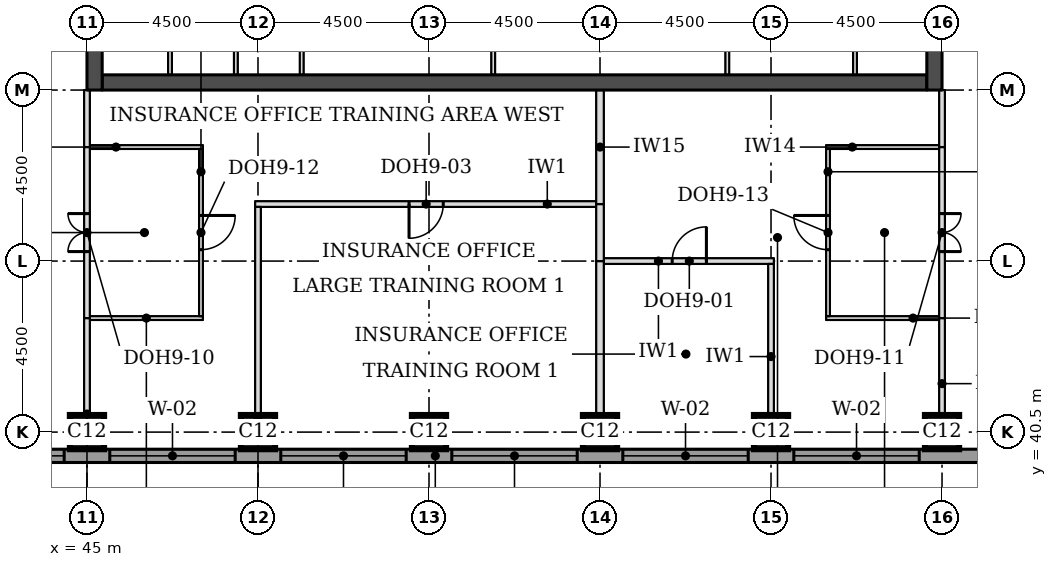
"""IFC4 building model, lengths in metres.
Left out: names, types, materials, properties, quantities, classifications, styles, units other than length and angle.
Written with IfcOpenShell. Run it as: python <this file> out.ifc"""

import sys

from ifc_helpers import new_model, si_unit, direction, frame, frame_2d, origin, origin_2d, place, context, subcontext, project, spatial, rectangle, extrude, element, fill, save


model = new_model("IFC4")
c1 = context("Model", 3, precision=1e-05, world=origin(), true_north=direction((0.0, 1.0)))
c2 = subcontext(c1, "Body", "Model", "MODEL_VIEW")
j1 = project(units=[si_unit("LENGTHUNIT", "METRE"), si_unit("PLANEANGLEUNIT", "RADIAN")], contexts=[c1])
p1 = place(None, origin())
s1 = spatial("IfcSite", under=j1, at=p1, CompositionType="ELEMENT")
p2 = place(p1, origin())
s2 = spatial("IfcBuilding", under=s1, at=p2, CompositionType="ELEMENT")
p3 = place(p2, frame((0.0, 0.0, 215.6)))
s3 = spatial("IfcBuildingStorey", under=s2, at=p3, CompositionType="ELEMENT", Elevation=215.6)
for number, where, z_axis, x_axis in (
    (1, (45.0, 40.5, 0.0), (0.0, 0.0, 1.0), (1.0, 0.0, 0.0)),
    (2, (49.5, 40.5, 0.0), (0.0, 0.0, 1.0), (1.0, 0.0, 0.0)),
    (3, (54.0, 40.5, 0.0), (0.0, 0.0, 1.0), (1.0, 0.0, 0.0)),
    (4, (58.5, 40.5, 0.0), (0.0, 0.0, 1.0), (1.0, 0.0, 0.0)),
    (5, (63.0, 40.5, 0.0), (0.0, 0.0, 1.0), (1.0, 0.0, 0.0)),
    (6, (67.5, 40.5, 0.0), (0.0, 0.0, 1.0), (1.0, 0.0, 0.0)),
):
    element("IfcColumn", number, at=place(p3, frame(where, z_axis=z_axis, x_axis=x_axis)), inside=s3, PredefinedType="COLUMN", context=c2, shape_type="SweptSolid", body=[
        extrude(rectangle(XDim=0.9, YDim=0.9, at=origin_2d()), origin(), (0.0, 0.0, 1.0), 3.7),
    ])
p4 = place(p3, frame((45.4, 49.7, 0.0), z_axis=(0.0, 0.0, 1.0), x_axis=(1.0, 0.0, 0.0)))
e7 = element("IfcWall", 7, at=p4, inside=s3, PredefinedType="SHEAR", context=c2, shape_type="SweptSolid", body=[
    extrude(rectangle(XDim=21.7, YDim=0.4, at=frame_2d((10.85, 0.0))), origin(), (0.0, 0.0, 1.0), 3.7),
])
p5 = place(p3, frame((45.2, 49.5, 0.0), z_axis=(0.0, 0.0, 1.0), x_axis=(0.0, 1.0, 0.0)))
e8 = element("IfcWall", 8, at=p5, inside=s3, PredefinedType="SHEAR", context=c2, shape_type="SweptSolid", body=[
    extrude(rectangle(XDim=22.5, YDim=0.4, at=frame_2d((11.25, 0.0))), origin(), (0.0, 0.0, 1.0), 3.7),
])
p6 = place(p5, frame((4.2, 0.0, 0.0)))
e9 = element("IfcOpeningElement", 9, at=p6, cuts=e8, PredefinedType="OPENING", context=c2, shape_type="SweptSolid", body=[
    extrude(rectangle(XDim=1.8, YDim=2.1, at=frame_2d((0.9, 1.05))), frame((0.0, 0.21, 0.0), z_axis=(0.0, -1.0, 0.0), x_axis=(1.0, 0.0, 0.0)), (0.0, 0.0, 1.0), 0.42),
])
p7 = place(p5, frame((6.9, 0.0, 0.0)))
e10 = element("IfcOpeningElement", 10, at=p7, cuts=e8, PredefinedType="OPENING", context=c2, shape_type="SweptSolid", body=[
    extrude(rectangle(XDim=1.1, YDim=2.1, at=frame_2d((0.55, 1.05))), frame((0.0, 0.21, 0.0), z_axis=(0.0, -1.0, 0.0), x_axis=(1.0, 0.0, 0.0)), (0.0, 0.0, 1.0), 0.42),
])
p8 = place(p5, frame((13.6, 0.0, 0.0)))
e11 = element("IfcOpeningElement", 11, at=p8, cuts=e8, PredefinedType="OPENING", context=c2, shape_type="SweptSolid", body=[
    extrude(rectangle(XDim=1.1, YDim=2.1, at=frame_2d((0.55, 1.05))), frame((0.0, 0.21, 0.0), z_axis=(0.0, -1.0, 0.0), x_axis=(1.0, 0.0, 0.0)), (0.0, 0.0, 1.0), 0.42),
])
p9 = place(p5, frame((16.5, 0.0, 0.0)))
e12 = element("IfcOpeningElement", 12, at=p9, cuts=e8, PredefinedType="OPENING", context=c2, shape_type="SweptSolid", body=[
    extrude(rectangle(XDim=1.8, YDim=2.1, at=frame_2d((0.9, 1.05))), frame((0.0, 0.21, 0.0), z_axis=(0.0, -1.0, 0.0), x_axis=(1.0, 0.0, 0.0)), (0.0, 0.0, 1.0), 0.42),
])
p10 = place(p3, frame((67.3, 49.5, 0.0), z_axis=(0.0, 0.0, 1.0), x_axis=(0.0, 1.0, 0.0)))
e13 = element("IfcWall", 13, at=p10, inside=s3, PredefinedType="SHEAR", context=c2, shape_type="SweptSolid", body=[
    extrude(rectangle(XDim=22.5, YDim=0.4, at=frame_2d((11.25, 0.0))), origin(), (0.0, 0.0, 1.0), 3.7),
])
p11 = place(p10, frame((4.2, 0.0, 0.0)))
e14 = element("IfcOpeningElement", 14, at=p11, cuts=e13, PredefinedType="OPENING", context=c2, shape_type="SweptSolid", body=[
    extrude(rectangle(XDim=1.8, YDim=2.1, at=frame_2d((0.9, 1.05))), frame((0.0, 0.21, 0.0), z_axis=(0.0, -1.0, 0.0), x_axis=(1.0, 0.0, 0.0)), (0.0, 0.0, 1.0), 0.42),
])
p12 = place(p10, frame((6.9, 0.0, 0.0)))
e15 = element("IfcOpeningElement", 15, at=p12, cuts=e13, PredefinedType="OPENING", context=c2, shape_type="SweptSolid", body=[
    extrude(rectangle(XDim=1.1, YDim=2.1, at=frame_2d((0.55, 1.05))), frame((0.0, 0.21, 0.0), z_axis=(0.0, -1.0, 0.0), x_axis=(1.0, 0.0, 0.0)), (0.0, 0.0, 1.0), 0.42),
])
p13 = place(p10, frame((13.6, 0.0, 0.0)))
e16 = element("IfcOpeningElement", 16, at=p13, cuts=e13, PredefinedType="OPENING", context=c2, shape_type="SweptSolid", body=[
    extrude(rectangle(XDim=1.1, YDim=2.1, at=frame_2d((0.55, 1.05))), frame((0.0, 0.21, 0.0), z_axis=(0.0, -1.0, 0.0), x_axis=(1.0, 0.0, 0.0)), (0.0, 0.0, 1.0), 0.42),
])
p14 = place(p10, frame((16.5, 0.0, 0.0)))
e17 = element("IfcOpeningElement", 17, at=p14, cuts=e13, PredefinedType="OPENING", context=c2, shape_type="SweptSolid", body=[
    extrude(rectangle(XDim=1.8, YDim=2.1, at=frame_2d((0.9, 1.05))), frame((0.0, 0.21, 0.0), z_axis=(0.0, -1.0, 0.0), x_axis=(1.0, 0.0, 0.0)), (0.0, 0.0, 1.0), 0.42),
])
p15 = place(p3, frame((36.0, 39.875, 0.0), z_axis=(0.0, 0.0, 1.0), x_axis=(1.0, 0.0, 0.0)))
e18 = element("IfcWall", 18, at=p15, inside=s3, PredefinedType="STANDARD", context=c2, shape_type="SweptSolid", body=[
    extrude(rectangle(XDim=36.331, YDim=0.35, at=frame_2d((18.166, 0.0))), origin(), (0.0, 0.0, 1.0), 3.525),
])
p16 = place(p15, frame((5.1, 0.0, 0.9)))
e19 = element("IfcOpeningElement", 19, at=p16, cuts=e18, PredefinedType="OPENING", context=c2, shape_type="SweptSolid", body=[
    extrude(rectangle(XDim=3.3, YDim=1.9, at=frame_2d((1.65, 0.95))), frame((0.0, 0.185, 0.0), z_axis=(0.0, -1.0, 0.0), x_axis=(1.0, 0.0, 0.0)), (0.0, 0.0, 1.0), 0.37),
])
p17 = place(p15, frame((9.6, 0.0, 0.9)))
e20 = element("IfcOpeningElement", 20, at=p17, cuts=e18, PredefinedType="OPENING", context=c2, shape_type="SweptSolid", body=[
    extrude(rectangle(XDim=3.3, YDim=1.9, at=frame_2d((1.65, 0.95))), frame((0.0, 0.185, 0.0), z_axis=(0.0, -1.0, 0.0), x_axis=(1.0, 0.0, 0.0)), (0.0, 0.0, 1.0), 0.37),
])
p18 = place(p15, frame((14.1, 0.0, 0.9)))
e21 = element("IfcOpeningElement", 21, at=p18, cuts=e18, PredefinedType="OPENING", context=c2, shape_type="SweptSolid", body=[
    extrude(rectangle(XDim=3.3, YDim=1.9, at=frame_2d((1.65, 0.95))), frame((0.0, 0.185, 0.0), z_axis=(0.0, -1.0, 0.0), x_axis=(1.0, 0.0, 0.0)), (0.0, 0.0, 1.0), 0.37),
])
p19 = place(p15, frame((18.6, 0.0, 0.9)))
e22 = element("IfcOpeningElement", 22, at=p19, cuts=e18, PredefinedType="OPENING", context=c2, shape_type="SweptSolid", body=[
    extrude(rectangle(XDim=3.3, YDim=1.9, at=frame_2d((1.65, 0.95))), frame((0.0, 0.185, 0.0), z_axis=(0.0, -1.0, 0.0), x_axis=(1.0, 0.0, 0.0)), (0.0, 0.0, 1.0), 0.37),
])
p20 = place(p15, frame((23.1, 0.0, 0.9)))
e23 = element("IfcOpeningElement", 23, at=p20, cuts=e18, PredefinedType="OPENING", context=c2, shape_type="SweptSolid", body=[
    extrude(rectangle(XDim=3.3, YDim=1.9, at=frame_2d((1.65, 0.95))), frame((0.0, 0.185, 0.0), z_axis=(0.0, -1.0, 0.0), x_axis=(1.0, 0.0, 0.0)), (0.0, 0.0, 1.0), 0.37),
])
p21 = place(p15, frame((27.6, 0.0, 0.9)))
e24 = element("IfcOpeningElement", 24, at=p21, cuts=e18, PredefinedType="OPENING", context=c2, shape_type="SweptSolid", body=[
    extrude(rectangle(XDim=3.3, YDim=1.9, at=frame_2d((1.65, 0.95))), frame((0.0, 0.185, 0.0), z_axis=(0.0, -1.0, 0.0), x_axis=(1.0, 0.0, 0.0)), (0.0, 0.0, 1.0), 0.37),
])
for number, where, z_axis, x_axis in (
    (25, (45.075, 43.5, 0.0), (0.0, 0.0, 1.0), (1.0, 0.0, 0.0)),
    (26, (64.45, 43.5, 0.0), (0.0, 0.0, 1.0), (1.0, 0.0, 0.0)),
):
    element("IfcWall", number, at=place(p3, frame(where, z_axis=z_axis, x_axis=x_axis)), inside=s3, PredefinedType="PARTITIONING", context=c2, shape_type="SweptSolid", body=[
        extrude(rectangle(XDim=2.975, YDim=0.1, at=frame_2d((1.488, 0.0))), origin(), (0.0, 0.0, 1.0), 3.55),
    ])
p22 = place(p3, frame((58.6, 45.0, 0.0), z_axis=(0.0, 0.0, 1.0), x_axis=(1.0, 0.0, 0.0)))
e27 = element("IfcWall", 27, at=p22, inside=s3, PredefinedType="PARTITIONING", context=c2, shape_type="SweptSolid", body=[
    extrude(rectangle(XDim=4.475, YDim=0.15, at=frame_2d((2.237, 0.0))), origin(), (0.0, 0.0, 1.0), 3.55),
])
p23 = place(p22, frame((1.8, 0.0, 0.0)))
e28 = element("IfcOpeningElement", 28, at=p23, cuts=e27, PredefinedType="OPENING", context=c2, shape_type="SweptSolid", body=[
    extrude(rectangle(XDim=0.9, YDim=2.1, at=frame_2d((0.45, 1.05))), frame((0.0, 0.085, 0.0), z_axis=(0.0, -1.0, 0.0), x_axis=(1.0, 0.0, 0.0)), (0.0, 0.0, 1.0), 0.17),
])
p24 = place(p3, frame((49.425, 46.5, 0.0), z_axis=(0.0, 0.0, 1.0), x_axis=(1.0, 0.0, 0.0)))
e29 = element("IfcWall", 29, at=p24, inside=s3, PredefinedType="PARTITIONING", context=c2, shape_type="SweptSolid", body=[
    extrude(rectangle(XDim=8.975, YDim=0.15, at=frame_2d((4.487, 0.0))), origin(), (0.0, 0.0, 1.0), 3.55),
])
p25 = place(p24, frame((4.05, 0.0, 0.0)))
e30 = element("IfcOpeningElement", 30, at=p25, cuts=e29, PredefinedType="OPENING", context=c2, shape_type="SweptSolid", body=[
    extrude(rectangle(XDim=0.9, YDim=2.1, at=frame_2d((0.45, 1.05))), frame((0.0, 0.085, 0.0), z_axis=(0.0, -1.0, 0.0), x_axis=(1.0, 0.0, 0.0)), (0.0, 0.0, 1.0), 0.17),
])
for number, where, z_axis, x_axis in (
    (31, (45.075, 48.0, 0.0), (0.0, 0.0, 1.0), (1.0, 0.0, 0.0)),
    (32, (64.45, 48.0, 0.0), (0.0, 0.0, 1.0), (1.0, 0.0, 0.0)),
):
    element("IfcWall", number, at=place(p3, frame(where, z_axis=z_axis, x_axis=x_axis)), inside=s3, PredefinedType="PARTITIONING", context=c2, shape_type="SweptSolid", body=[
        extrude(rectangle(XDim=2.975, YDim=0.1, at=frame_2d((1.488, 0.0))), origin(), (0.0, 0.0, 1.0), 3.55),
    ])
p26 = place(p3, frame((45.0, 40.05, 0.0), z_axis=(0.0, 0.0, 1.0), x_axis=(0.0, 1.0, 0.0)))
e33 = element("IfcWall", 33, at=p26, inside=s3, PredefinedType="PARTITIONING", context=c2, shape_type="SweptSolid", body=[
    extrude(rectangle(XDim=3.45, YDim=0.15, at=frame_2d((1.725, 0.0))), origin(), (0.0, 0.0, 1.0), 3.022),
])
p27 = place(p3, frame((49.5, 40.05, 0.0), z_axis=(0.0, 0.0, 1.0), x_axis=(0.0, 1.0, 0.0)))
e34 = element("IfcWall", 34, at=p27, inside=s3, PredefinedType="PARTITIONING", context=c2, shape_type="SweptSolid", body=[
    extrude(rectangle(XDim=6.375, YDim=0.15, at=frame_2d((3.188, 0.0))), origin(), (0.0, 0.0, 1.0), 3.55),
])
p28 = place(p3, frame((58.5, 40.05, 0.0), z_axis=(0.0, 0.0, 1.0), x_axis=(0.0, 1.0, 0.0)))
e35 = element("IfcWall", 35, at=p28, inside=s3, PredefinedType="PARTITIONING", context=c2, shape_type="SweptSolid", body=[
    extrude(rectangle(XDim=4.95, YDim=0.2, at=frame_2d((2.475, 0.0))), origin(), (0.0, 0.0, 1.0), 3.55),
])
p29 = place(p3, frame((63.0, 40.05, 0.0), z_axis=(0.0, 0.0, 1.0), x_axis=(0.0, 1.0, 0.0)))
e36 = element("IfcWall", 36, at=p29, inside=s3, PredefinedType="PARTITIONING", context=c2, shape_type="SweptSolid", body=[
    extrude(rectangle(XDim=4.875, YDim=0.15, at=frame_2d((2.438, 0.0))), origin(), (0.0, 0.0, 1.0), 3.55),
])
p30 = place(p3, frame((67.5, 40.05, 0.0), z_axis=(0.0, 0.0, 1.0), x_axis=(0.0, 1.0, 0.0)))
e37 = element("IfcWall", 37, at=p30, inside=s3, PredefinedType="PARTITIONING", context=c2, shape_type="SweptSolid", body=[
    extrude(rectangle(XDim=3.45, YDim=0.15, at=frame_2d((1.725, 0.0))), origin(), (0.0, 0.0, 1.0), 3.022),
])
p31 = place(p3, frame((45.0, 43.5, 0.0), z_axis=(0.0, 0.0, 1.0), x_axis=(0.0, 1.0, 0.0)))
e38 = element("IfcWall", 38, at=p31, inside=s3, PredefinedType="PARTITIONING", context=c2, shape_type="SweptSolid", body=[
    extrude(rectangle(XDim=4.5, YDim=0.15, at=frame_2d((2.25, 0.0))), origin(), (0.0, 0.0, 1.0), 3.022),
])
p32 = place(p31, frame((1.75, 0.0, 0.0)))
e39 = element("IfcOpeningElement", 39, at=p32, cuts=e38, PredefinedType="OPENING", context=c2, shape_type="SweptSolid", body=[
    extrude(rectangle(XDim=1.0, YDim=2.1, at=frame_2d((0.5, 1.05))), frame((0.0, 0.085, 0.0), z_axis=(0.0, -1.0, 0.0), x_axis=(1.0, 0.0, 0.0)), (0.0, 0.0, 1.0), 0.17),
])
p33 = place(p3, frame((67.5, 43.5, 0.0), z_axis=(0.0, 0.0, 1.0), x_axis=(0.0, 1.0, 0.0)))
e40 = element("IfcWall", 40, at=p33, inside=s3, PredefinedType="PARTITIONING", context=c2, shape_type="SweptSolid", body=[
    extrude(rectangle(XDim=4.5, YDim=0.15, at=frame_2d((2.25, 0.0))), origin(), (0.0, 0.0, 1.0), 3.022),
])
p34 = place(p33, frame((1.75, 0.0, 0.0)))
e41 = element("IfcOpeningElement", 41, at=p34, cuts=e40, PredefinedType="OPENING", context=c2, shape_type="SweptSolid", body=[
    extrude(rectangle(XDim=1.0, YDim=2.1, at=frame_2d((0.5, 1.05))), frame((0.0, 0.085, 0.0), z_axis=(0.0, -1.0, 0.0), x_axis=(1.0, 0.0, 0.0)), (0.0, 0.0, 1.0), 0.17),
])
p35 = place(p3, frame((48.0, 43.55, 0.0), z_axis=(0.0, 0.0, 1.0), x_axis=(0.0, 1.0, 0.0)))
e42 = element("IfcWall", 42, at=p35, inside=s3, PredefinedType="PARTITIONING", context=c2, shape_type="SweptSolid", body=[
    extrude(rectangle(XDim=4.4, YDim=0.1, at=frame_2d((2.2, 0.0))), origin(), (0.0, 0.0, 1.0), 3.55),
])
p36 = place(p35, frame((1.75, 0.0, 0.0)))
e43 = element("IfcOpeningElement", 43, at=p36, cuts=e42, PredefinedType="OPENING", context=c2, shape_type="SweptSolid", body=[
    extrude(rectangle(XDim=0.9, YDim=2.1, at=frame_2d((0.45, 1.05))), frame((0.0, 0.06, 0.0), z_axis=(0.0, -1.0, 0.0), x_axis=(1.0, 0.0, 0.0)), (0.0, 0.0, 1.0), 0.12),
])
p37 = place(p3, frame((64.5, 43.55, 0.0), z_axis=(0.0, 0.0, 1.0), x_axis=(0.0, 1.0, 0.0)))
e44 = element("IfcWall", 44, at=p37, inside=s3, PredefinedType="PARTITIONING", context=c2, shape_type="SweptSolid", body=[
    extrude(rectangle(XDim=4.4, YDim=0.1, at=frame_2d((2.2, 0.0))), origin(), (0.0, 0.0, 1.0), 3.55),
])
p38 = place(p37, frame((1.75, 0.0, 0.0)))
e45 = element("IfcOpeningElement", 45, at=p38, cuts=e44, PredefinedType="OPENING", context=c2, shape_type="SweptSolid", body=[
    extrude(rectangle(XDim=0.9, YDim=2.1, at=frame_2d((0.45, 1.05))), frame((0.0, 0.06, 0.0), z_axis=(0.0, -1.0, 0.0), x_axis=(1.0, 0.0, 0.0)), (0.0, 0.0, 1.0), 0.12),
])
p39 = place(p3, frame((58.5, 45.0, 0.0), z_axis=(0.0, 0.0, 1.0), x_axis=(0.0, 1.0, 0.0)))
e46 = element("IfcWall", 46, at=p39, inside=s3, PredefinedType="PARTITIONING", context=c2, shape_type="SweptSolid", body=[
    extrude(rectangle(XDim=1.5, YDim=0.2, at=frame_2d((0.75, 0.0))), origin(), (0.0, 0.0, 1.0), 3.55),
])
p40 = place(p3, frame((58.5, 46.5, 0.0), z_axis=(0.0, 0.0, 1.0), x_axis=(0.0, 1.0, 0.0)))
e47 = element("IfcWall", 47, at=p40, inside=s3, PredefinedType="PARTITIONING", context=c2, shape_type="SweptSolid", body=[
    extrude(rectangle(XDim=3.0, YDim=0.2, at=frame_2d((1.5, 0.0))), origin(), (0.0, 0.0, 1.0), 3.55),
])
for number, where, z_axis, x_axis in (
    (48, (45.0, 48.0, 0.0), (0.0, 0.0, 1.0), (0.0, 1.0, 0.0)),
    (49, (67.5, 48.0, 0.0), (0.0, 0.0, 1.0), (0.0, 1.0, 0.0)),
):
    element("IfcWall", number, at=place(p3, frame(where, z_axis=z_axis, x_axis=x_axis)), inside=s3, PredefinedType="PARTITIONING", context=c2, shape_type="SweptSolid", body=[
        extrude(rectangle(XDim=1.5, YDim=0.15, at=frame_2d((0.75, 0.0))), origin(), (0.0, 0.0, 1.0), 3.022),
    ])
for number, where, z_axis, x_axis in (
    (50, (47.185, 49.9, 0.0), (0.0, 0.0, 1.0), (0.0, 1.0, 0.0)),
    (51, (48.917, 49.9, 0.0), (0.0, 0.0, 1.0), (0.0, 1.0, 0.0)),
    (52, (50.65, 49.9, 0.0), (0.0, 0.0, 1.0), (0.0, 1.0, 0.0)),
    (53, (55.69, 49.9, 0.0), (0.0, 0.0, 1.0), (0.0, 1.0, 0.0)),
    (54, (61.85, 49.9, 0.0), (0.0, 0.0, 1.0), (0.0, 1.0, 0.0)),
    (55, (65.21, 49.9, 0.0), (0.0, 0.0, 1.0), (0.0, 1.0, 0.0)),
):
    element("IfcWall", number, at=place(p3, frame(where, z_axis=z_axis, x_axis=x_axis)), inside=s3, PredefinedType="PARTITIONING", context=c2, shape_type="SweptSolid", body=[
        extrude(rectangle(XDim=3.1, YDim=0.1, at=frame_2d((1.55, 0.0))), origin(), (0.0, 0.0, 1.0), 3.55),
    ])
p41 = place(p16, origin())
e56 = element("IfcWindow", 56, at=p41, inside=s3, PartitioningType="SINGLE_PANEL", PredefinedType="WINDOW", context=c2, shape_type="SweptSolid", body=[
    extrude(rectangle(XDim=3.3, YDim=1.9, at=frame_2d((1.65, 0.95))), frame((0.0, 0.085, 0.0), z_axis=(0.0, -1.0, 0.0), x_axis=(1.0, 0.0, 0.0)), (0.0, 0.0, 1.0), 0.06),
])
fill(e19, e56)
p42 = place(p17, origin())
e57 = element("IfcWindow", 57, at=p42, inside=s3, PartitioningType="SINGLE_PANEL", PredefinedType="WINDOW", context=c2, shape_type="SweptSolid", body=[
    extrude(rectangle(XDim=3.3, YDim=1.9, at=frame_2d((1.65, 0.95))), frame((0.0, 0.085, 0.0), z_axis=(0.0, -1.0, 0.0), x_axis=(1.0, 0.0, 0.0)), (0.0, 0.0, 1.0), 0.06),
])
fill(e20, e57)
p43 = place(p18, origin())
e58 = element("IfcWindow", 58, at=p43, inside=s3, PartitioningType="SINGLE_PANEL", PredefinedType="WINDOW", context=c2, shape_type="SweptSolid", body=[
    extrude(rectangle(XDim=3.3, YDim=1.9, at=frame_2d((1.65, 0.95))), frame((0.0, 0.085, 0.0), z_axis=(0.0, -1.0, 0.0), x_axis=(1.0, 0.0, 0.0)), (0.0, 0.0, 1.0), 0.06),
])
fill(e21, e58)
p44 = place(p19, origin())
e59 = element("IfcWindow", 59, at=p44, inside=s3, PartitioningType="SINGLE_PANEL", PredefinedType="WINDOW", context=c2, shape_type="SweptSolid", body=[
    extrude(rectangle(XDim=3.3, YDim=1.9, at=frame_2d((1.65, 0.95))), frame((0.0, 0.085, 0.0), z_axis=(0.0, -1.0, 0.0), x_axis=(1.0, 0.0, 0.0)), (0.0, 0.0, 1.0), 0.06),
])
fill(e22, e59)
p45 = place(p20, origin())
e60 = element("IfcWindow", 60, at=p45, inside=s3, PartitioningType="SINGLE_PANEL", PredefinedType="WINDOW", context=c2, shape_type="SweptSolid", body=[
    extrude(rectangle(XDim=3.3, YDim=1.9, at=frame_2d((1.65, 0.95))), frame((0.0, 0.085, 0.0), z_axis=(0.0, -1.0, 0.0), x_axis=(1.0, 0.0, 0.0)), (0.0, 0.0, 1.0), 0.06),
])
fill(e23, e60)
p46 = place(p21, origin())
e61 = element("IfcWindow", 61, at=p46, inside=s3, PartitioningType="SINGLE_PANEL", PredefinedType="WINDOW", context=c2, shape_type="SweptSolid", body=[
    extrude(rectangle(XDim=3.3, YDim=1.9, at=frame_2d((1.65, 0.95))), frame((0.0, 0.085, 0.0), z_axis=(0.0, -1.0, 0.0), x_axis=(1.0, 0.0, 0.0)), (0.0, 0.0, 1.0), 0.06),
])
fill(e24, e61)
p47 = place(p32, origin())
e62 = element("IfcDoor", 62, at=p47, inside=s3, OperationType="DOUBLE_DOOR_SINGLE_SWING", PredefinedType="DOOR", context=c2, shape_type="SweptSolid", body=[
    extrude(rectangle(XDim=1.0, YDim=2.1, at=frame_2d((0.5, 1.05))), frame((0.0, 0.025, 0.0), z_axis=(0.0, -1.0, 0.0), x_axis=(1.0, 0.0, 0.0)), (0.0, 0.0, 1.0), 0.05),
])
fill(e39, e62)
p48 = place(p36, frame((0.9, 0.0, 0.0), z_axis=(0.0, 0.0, 1.0), x_axis=(-1.0, 0.0, 0.0)))
e63 = element("IfcDoor", 63, at=p48, inside=s3, OperationType="SINGLE_SWING_LEFT", PredefinedType="DOOR", context=c2, shape_type="SweptSolid", body=[
    extrude(rectangle(XDim=0.9, YDim=2.1, at=frame_2d((0.45, 1.05))), frame((0.0, 0.025, 0.0), z_axis=(0.0, -1.0, 0.0), x_axis=(1.0, 0.0, 0.0)), (0.0, 0.0, 1.0), 0.05),
])
fill(e43, e63)
p49 = place(p25, frame((0.9, 0.0, 0.0), z_axis=(0.0, 0.0, 1.0), x_axis=(-1.0, 0.0, 0.0)))
e64 = element("IfcDoor", 64, at=p49, inside=s3, OperationType="SINGLE_SWING_RIGHT", PredefinedType="DOOR", context=c2, shape_type="SweptSolid", body=[
    extrude(rectangle(XDim=0.9, YDim=2.1, at=frame_2d((0.45, 1.05))), frame((0.0, 0.025, 0.0), z_axis=(0.0, -1.0, 0.0), x_axis=(1.0, 0.0, 0.0)), (0.0, 0.0, 1.0), 0.05),
])
fill(e30, e64)
p50 = place(p34, frame((1.0, 0.0, 0.0), z_axis=(0.0, 0.0, 1.0), x_axis=(-1.0, 0.0, 0.0)))
e65 = element("IfcDoor", 65, at=p50, inside=s3, OperationType="DOUBLE_DOOR_SINGLE_SWING", PredefinedType="DOOR", context=c2, shape_type="SweptSolid", body=[
    extrude(rectangle(XDim=1.0, YDim=2.1, at=frame_2d((0.5, 1.05))), frame((0.0, 0.025, 0.0), z_axis=(0.0, -1.0, 0.0), x_axis=(1.0, 0.0, 0.0)), (0.0, 0.0, 1.0), 0.05),
])
fill(e41, e65)
p51 = place(p38, origin())
e66 = element("IfcDoor", 66, at=p51, inside=s3, OperationType="SINGLE_SWING_RIGHT", PredefinedType="DOOR", context=c2, shape_type="SweptSolid", body=[
    extrude(rectangle(XDim=0.9, YDim=2.1, at=frame_2d((0.45, 1.05))), frame((0.0, 0.025, 0.0), z_axis=(0.0, -1.0, 0.0), x_axis=(1.0, 0.0, 0.0)), (0.0, 0.0, 1.0), 0.05),
])
fill(e45, e66)
p52 = place(p23, origin())
e67 = element("IfcDoor", 67, at=p52, inside=s3, OperationType="SINGLE_SWING_RIGHT", PredefinedType="DOOR", context=c2, shape_type="SweptSolid", body=[
    extrude(rectangle(XDim=0.9, YDim=2.1, at=frame_2d((0.45, 1.05))), frame((0.0, 0.025, 0.0), z_axis=(0.0, -1.0, 0.0), x_axis=(1.0, 0.0, 0.0)), (0.0, 0.0, 1.0), 0.05),
])
fill(e28, e67)
save(model, sys.argv[1])
